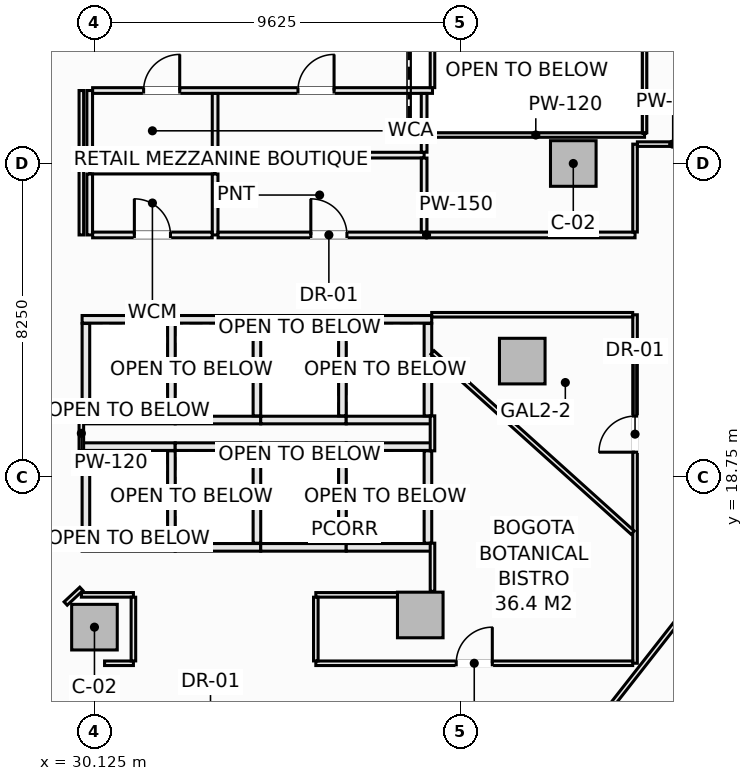
"""IFC4 building model, lengths in metres.
Left out: names, types, materials, properties, quantities, classifications, styles, units other than length and angle.
Written with IfcOpenShell. Run it as: python <this file> out.ifc"""

import sys

from ifc_helpers import new_model, si_unit, direction, frame, frame_2d, origin, origin_2d, place, context, subcontext, project, spatial, rectangle, extrude, element, fill, save


model = new_model("IFC4")
c1 = context("Model", 3, precision=1e-05, world=origin(), true_north=direction((0.0, 1.0)))
c2 = subcontext(c1, "Body", "Model", "MODEL_VIEW")
j1 = project(units=[si_unit("LENGTHUNIT", "METRE"), si_unit("PLANEANGLEUNIT", "RADIAN")], contexts=[c1])
p1 = place(None, origin())
s1 = spatial("IfcSite", under=j1, at=p1, CompositionType="ELEMENT")
p2 = place(p1, origin())
s2 = spatial("IfcBuilding", under=s1, at=p2, CompositionType="ELEMENT")
p3 = place(p2, frame((0.0, 0.0, 5.0)))
s3 = spatial("IfcBuildingStorey", under=s2, at=p3, CompositionType="ELEMENT", Elevation=5.0)
for number, where, z_axis, x_axis in (
    (1, (42.725, 27.0, -0.26), (0.0, 0.0, 1.0), (1.0, 0.0, 0.0)),
    (2, (30.125, 14.8, -0.26), (0.0, 0.0, 1.0), (1.0, 0.0, 0.0)),
    (3, (38.698, 15.121, -0.26), (0.0, 0.0, 1.0), (1.0, 0.0, 0.0)),
    (4, (41.382, 21.801, -0.26), (0.0, 0.0, 1.0), (1.0, 0.0, 0.0)),
):
    element("IfcColumn", number, at=place(p3, frame(where, z_axis=z_axis, x_axis=x_axis)), inside=s3, PredefinedType="COLUMN", context=c2, shape_type="SweptSolid", body=[
        extrude(rectangle(XDim=1.2, YDim=1.2, at=origin_2d()), origin(), (0.0, 0.0, 1.0), 5.0),
    ])
for number, where, z_axis, x_axis in (
    (5, (29.8, 19.55, 0.0), (0.0, 0.0, 1.0), (1.0, 0.0, 0.0)),
    (6, (29.8, 16.9, 0.0), (0.0, 0.0, 1.0), (1.0, 0.0, 0.0)),
):
    element("IfcWall", number, at=place(p3, frame(where, z_axis=z_axis, x_axis=x_axis)), inside=s3, PredefinedType="SOLIDWALL", context=c2, shape_type="SweptSolid", body=[
        extrude(rectangle(XDim=2.45, YDim=0.2, at=frame_2d((1.225, 0.0))), origin(), (0.0, 0.0, 1.0), 4.74),
    ])
for number, where, z_axis, x_axis in (
    (7, (29.9, 17.01, 0.0), (0.0, 0.0, 1.0), (0.0, 1.0, 0.0)),
    (8, (32.15, 17.01, 0.0), (0.0, 0.0, 1.0), (0.0, 1.0, 0.0)),
):
    element("IfcWall", number, at=place(p3, frame(where, z_axis=z_axis, x_axis=x_axis)), inside=s3, PredefinedType="SOLIDWALL", context=c2, shape_type="SweptSolid", body=[
        extrude(rectangle(XDim=2.43, YDim=0.2, at=frame_2d((1.215, 0.0))), origin(), (0.0, 0.0, 1.0), 4.74),
    ])
for number, where, z_axis, x_axis in (
    (9, (32.25, 19.55, 0.0), (0.0, 0.0, 1.0), (1.0, 0.0, 0.0)),
    (10, (32.25, 16.9, 0.0), (0.0, 0.0, 1.0), (1.0, 0.0, 0.0)),
):
    element("IfcWall", number, at=place(p3, frame(where, z_axis=z_axis, x_axis=x_axis)), inside=s3, PredefinedType="SOLIDWALL", context=c2, shape_type="SweptSolid", body=[
        extrude(rectangle(XDim=2.25, YDim=0.2, at=frame_2d((1.125, 0.0))), origin(), (0.0, 0.0, 1.0), 4.74),
    ])
p4 = place(p3, frame((34.4, 17.01, 0.0), z_axis=(0.0, 0.0, 1.0), x_axis=(0.0, 1.0, 0.0)))
e11 = element("IfcWall", 11, at=p4, inside=s3, PredefinedType="SOLIDWALL", context=c2, shape_type="SweptSolid", body=[
    extrude(rectangle(XDim=2.43, YDim=0.2, at=frame_2d((1.215, 0.0))), origin(), (0.0, 0.0, 1.0), 4.74),
])
for number, where, z_axis, x_axis in (
    (12, (34.5, 19.55, 0.0), (0.0, 0.0, 1.0), (1.0, 0.0, 0.0)),
    (13, (34.5, 16.9, 0.0), (0.0, 0.0, 1.0), (1.0, 0.0, 0.0)),
):
    element("IfcWall", number, at=place(p3, frame(where, z_axis=z_axis, x_axis=x_axis)), inside=s3, PredefinedType="SOLIDWALL", context=c2, shape_type="SweptSolid", body=[
        extrude(rectangle(XDim=2.25, YDim=0.2, at=frame_2d((1.125, 0.0))), origin(), (0.0, 0.0, 1.0), 4.74),
    ])
p5 = place(p3, frame((36.65, 17.01, 0.0), z_axis=(0.0, 0.0, 1.0), x_axis=(0.0, 1.0, 0.0)))
e14 = element("IfcWall", 14, at=p5, inside=s3, PredefinedType="SOLIDWALL", context=c2, shape_type="SweptSolid", body=[
    extrude(rectangle(XDim=2.43, YDim=0.2, at=frame_2d((1.215, 0.0))), origin(), (0.0, 0.0, 1.0), 4.74),
])
for number, where, z_axis, x_axis in (
    (15, (36.75, 19.55, 0.0), (0.0, 0.0, 1.0), (1.0, 0.0, 0.0)),
    (16, (36.75, 16.9, 0.0), (0.0, 0.0, 1.0), (1.0, 0.0, 0.0)),
):
    element("IfcWall", number, at=place(p3, frame(where, z_axis=z_axis, x_axis=x_axis)), inside=s3, PredefinedType="SOLIDWALL", context=c2, shape_type="SweptSolid", body=[
        extrude(rectangle(XDim=2.25, YDim=0.2, at=frame_2d((1.125, 0.0))), origin(), (0.0, 0.0, 1.0), 4.74),
    ])
p6 = place(p3, frame((38.9, 17.01, 0.0), z_axis=(0.0, 0.0, 1.0), x_axis=(0.0, 1.0, 0.0)))
e17 = element("IfcWall", 17, at=p6, inside=s3, PredefinedType="SOLIDWALL", context=c2, shape_type="SweptSolid", body=[
    extrude(rectangle(XDim=2.43, YDim=0.2, at=frame_2d((1.215, 0.0))), origin(), (0.0, 0.0, 1.0), 4.74),
])
for number, where, z_axis, x_axis in (
    (18, (29.8, 22.9, 0.0), (0.0, 0.0, 1.0), (1.0, 0.0, 0.0)),
    (19, (29.8, 20.25, 0.0), (0.0, 0.0, 1.0), (1.0, 0.0, 0.0)),
):
    element("IfcWall", number, at=place(p3, frame(where, z_axis=z_axis, x_axis=x_axis)), inside=s3, PredefinedType="SOLIDWALL", context=c2, shape_type="SweptSolid", body=[
        extrude(rectangle(XDim=2.45, YDim=0.2, at=frame_2d((1.225, 0.0))), origin(), (0.0, 0.0, 1.0), 4.74),
    ])
for number, where, z_axis, x_axis in (
    (20, (29.9, 20.36, 0.0), (0.0, 0.0, 1.0), (0.0, 1.0, 0.0)),
    (21, (32.15, 20.36, 0.0), (0.0, 0.0, 1.0), (0.0, 1.0, 0.0)),
):
    element("IfcWall", number, at=place(p3, frame(where, z_axis=z_axis, x_axis=x_axis)), inside=s3, PredefinedType="SOLIDWALL", context=c2, shape_type="SweptSolid", body=[
        extrude(rectangle(XDim=2.43, YDim=0.2, at=frame_2d((1.215, 0.0))), origin(), (0.0, 0.0, 1.0), 4.74),
    ])
for number, where, z_axis, x_axis in (
    (22, (32.25, 22.9, 0.0), (0.0, 0.0, 1.0), (1.0, 0.0, 0.0)),
    (23, (32.25, 20.25, 0.0), (0.0, 0.0, 1.0), (1.0, 0.0, 0.0)),
):
    element("IfcWall", number, at=place(p3, frame(where, z_axis=z_axis, x_axis=x_axis)), inside=s3, PredefinedType="SOLIDWALL", context=c2, shape_type="SweptSolid", body=[
        extrude(rectangle(XDim=2.25, YDim=0.2, at=frame_2d((1.125, 0.0))), origin(), (0.0, 0.0, 1.0), 4.74),
    ])
p7 = place(p3, frame((34.4, 20.36, 0.0), z_axis=(0.0, 0.0, 1.0), x_axis=(0.0, 1.0, 0.0)))
e24 = element("IfcWall", 24, at=p7, inside=s3, PredefinedType="SOLIDWALL", context=c2, shape_type="SweptSolid", body=[
    extrude(rectangle(XDim=2.43, YDim=0.2, at=frame_2d((1.215, 0.0))), origin(), (0.0, 0.0, 1.0), 4.74),
])
for number, where, z_axis, x_axis in (
    (25, (34.5, 22.9, 0.0), (0.0, 0.0, 1.0), (1.0, 0.0, 0.0)),
    (26, (34.5, 20.25, 0.0), (0.0, 0.0, 1.0), (1.0, 0.0, 0.0)),
):
    element("IfcWall", number, at=place(p3, frame(where, z_axis=z_axis, x_axis=x_axis)), inside=s3, PredefinedType="SOLIDWALL", context=c2, shape_type="SweptSolid", body=[
        extrude(rectangle(XDim=2.25, YDim=0.2, at=frame_2d((1.125, 0.0))), origin(), (0.0, 0.0, 1.0), 4.74),
    ])
p8 = place(p3, frame((36.65, 20.36, 0.0), z_axis=(0.0, 0.0, 1.0), x_axis=(0.0, 1.0, 0.0)))
e27 = element("IfcWall", 27, at=p8, inside=s3, PredefinedType="SOLIDWALL", context=c2, shape_type="SweptSolid", body=[
    extrude(rectangle(XDim=2.43, YDim=0.2, at=frame_2d((1.215, 0.0))), origin(), (0.0, 0.0, 1.0), 4.74),
])
for number, where, z_axis, x_axis in (
    (28, (36.75, 22.9, 0.0), (0.0, 0.0, 1.0), (1.0, 0.0, 0.0)),
    (29, (36.75, 20.25, 0.0), (0.0, 0.0, 1.0), (1.0, 0.0, 0.0)),
):
    element("IfcWall", number, at=place(p3, frame(where, z_axis=z_axis, x_axis=x_axis)), inside=s3, PredefinedType="SOLIDWALL", context=c2, shape_type="SweptSolid", body=[
        extrude(rectangle(XDim=2.25, YDim=0.2, at=frame_2d((1.125, 0.0))), origin(), (0.0, 0.0, 1.0), 4.74),
    ])
p9 = place(p3, frame((38.9, 20.36, 0.0), z_axis=(0.0, 0.0, 1.0), x_axis=(0.0, 1.0, 0.0)))
e30 = element("IfcWall", 30, at=p9, inside=s3, PredefinedType="SOLIDWALL", context=c2, shape_type="SweptSolid", body=[
    extrude(rectangle(XDim=2.43, YDim=0.2, at=frame_2d((1.215, 0.0))), origin(), (0.0, 0.0, 1.0), 4.74),
])
p10 = place(p3, frame((30.0, 26.8, 0.0), z_axis=(0.0, 0.0, 1.0), x_axis=(1.0, 0.0, 0.0)))
e31 = element("IfcWall", 31, at=p10, inside=s3, PredefinedType="PARTITIONING", context=c2, shape_type="SweptSolid", body=[
    extrude(rectangle(XDim=3.3, YDim=0.15, at=frame_2d((1.65, 0.0))), origin(), (0.0, 0.0, 1.0), 4.74),
])
p11 = place(p3, frame((30.0, 25.12, 0.0), z_axis=(0.0, 0.0, 1.0), x_axis=(0.0, 1.0, 0.0)))
e32 = element("IfcWall", 32, at=p11, inside=s3, PredefinedType="PARTITIONING", context=c2, shape_type="SweptSolid", body=[
    extrude(rectangle(XDim=1.603, YDim=0.15, at=frame_2d((0.801, 0.0))), origin(), (0.0, 0.0, 1.0), 4.74),
])
p12 = place(p3, frame((30.0, 26.877, 0.0), z_axis=(0.0, 0.0, 1.0), x_axis=(0.0, 1.0, 0.0)))
e33 = element("IfcWall", 33, at=p12, inside=s3, PredefinedType="PARTITIONING", context=c2, shape_type="SweptSolid", body=[
    extrude(rectangle(XDim=2.043, YDim=0.15, at=frame_2d((1.021, 0.0))), origin(), (0.0, 0.0, 1.0), 4.74),
])
p13 = place(p3, frame((30.077, 28.92, 0.0), z_axis=(0.0, 0.0, 1.0), x_axis=(1.0, 0.0, 0.0)))
e34 = element("IfcWall", 34, at=p13, inside=s3, PredefinedType="PARTITIONING", context=c2, shape_type="SweptSolid", body=[
    extrude(rectangle(XDim=8.943, YDim=0.15, at=frame_2d((4.472, 0.0))), origin(), (0.0, 0.0, 1.0), 4.74),
])
p14 = place(p13, frame((1.342, 0.0, 0.0)))
e35 = element("IfcOpeningElement", 35, at=p14, cuts=e34, PredefinedType="OPENING", context=c2, shape_type="SweptSolid", body=[
    extrude(rectangle(XDim=0.95, YDim=2.1, at=frame_2d((0.475, 1.05))), frame((0.0, 0.085, 0.0), z_axis=(0.0, -1.0, 0.0), x_axis=(1.0, 0.0, 0.0)), (0.0, 0.0, 1.0), 0.17),
])
p15 = place(p13, frame((5.403, 0.0, 0.0)))
e36 = element("IfcOpeningElement", 36, at=p15, cuts=e34, PredefinedType="OPENING", context=c2, shape_type="SweptSolid", body=[
    extrude(rectangle(XDim=0.95, YDim=2.1, at=frame_2d((0.475, 1.05))), frame((0.0, 0.085, 0.0), z_axis=(0.0, -1.0, 0.0), x_axis=(1.0, 0.0, 0.0)), (0.0, 0.0, 1.0), 0.17),
])
p16 = place(p3, frame((33.3, 25.12, 0.0), z_axis=(0.0, 0.0, 1.0), x_axis=(0.0, 1.0, 0.0)))
e37 = element("IfcWall", 37, at=p16, inside=s3, PredefinedType="PARTITIONING", context=c2, shape_type="SweptSolid", body=[
    extrude(rectangle(XDim=1.603, YDim=0.15, at=frame_2d((0.801, 0.0))), origin(), (0.0, 0.0, 1.0), 4.74),
])
p17 = place(p3, frame((33.3, 26.877, 0.0), z_axis=(0.0, 0.0, 1.0), x_axis=(0.0, 1.0, 0.0)))
e38 = element("IfcWall", 38, at=p17, inside=s3, PredefinedType="PARTITIONING", context=c2, shape_type="SweptSolid", body=[
    extrude(rectangle(XDim=1.966, YDim=0.15, at=frame_2d((0.983, 0.0))), origin(), (0.0, 0.0, 1.0), 4.74),
])
p18 = place(p3, frame((30.077, 25.12, 0.0), z_axis=(0.0, 0.0, 1.0), x_axis=(1.0, 0.0, 0.0)))
e39 = element("IfcWall", 39, at=p18, inside=s3, PredefinedType="PARTITIONING", context=c2, shape_type="SweptSolid", body=[
    extrude(rectangle(XDim=3.146, YDim=0.15, at=frame_2d((1.573, 0.0))), origin(), (0.0, 0.0, 1.0), 4.74),
])
p19 = place(p18, frame((1.098, 0.0, 0.0)))
e40 = element("IfcOpeningElement", 40, at=p19, cuts=e39, PredefinedType="OPENING", context=c2, shape_type="SweptSolid", body=[
    extrude(rectangle(XDim=0.95, YDim=2.1, at=frame_2d((0.475, 1.05))), frame((0.0, 0.085, 0.0), z_axis=(0.0, -1.0, 0.0), x_axis=(1.0, 0.0, 0.0)), (0.0, 0.0, 1.0), 0.17),
])
p20 = place(p3, frame((33.377, 25.12, 0.0), z_axis=(0.0, 0.0, 1.0), x_axis=(1.0, 0.0, 0.0)))
e41 = element("IfcWall", 41, at=p20, inside=s3, PredefinedType="PARTITIONING", context=c2, shape_type="SweptSolid", body=[
    extrude(rectangle(XDim=10.973, YDim=0.15, at=frame_2d((5.487, 0.0))), origin(), (0.0, 0.0, 1.0), 4.74),
])
p21 = place(p20, frame((2.441, 0.0, 0.0)))
e42 = element("IfcOpeningElement", 42, at=p21, cuts=e41, PredefinedType="OPENING", context=c2, shape_type="SweptSolid", body=[
    extrude(rectangle(XDim=0.95, YDim=2.1, at=frame_2d((0.475, 1.05))), frame((0.0, 0.085, 0.0), z_axis=(0.0, -1.0, 0.0), x_axis=(1.0, 0.0, 0.0)), (0.0, 0.0, 1.0), 0.17),
])
p22 = place(p3, frame((33.377, 27.22, 0.0), z_axis=(0.0, 0.0, 1.0), x_axis=(1.0, 0.0, 0.0)))
e43 = element("IfcWall", 43, at=p22, inside=s3, PredefinedType="PARTITIONING", context=c2, shape_type="SweptSolid", body=[
    extrude(rectangle(XDim=5.423, YDim=0.15, at=frame_2d((2.711, 0.0))), origin(), (0.0, 0.0, 1.0), 4.74),
])
p23 = place(p3, frame((38.8, 25.197, 0.0), z_axis=(0.0, 0.0, 1.0), x_axis=(0.0, 1.0, 0.0)))
e44 = element("IfcWall", 44, at=p23, inside=s3, PredefinedType="PARTITIONING", context=c2, shape_type="SweptSolid", body=[
    extrude(rectangle(XDim=1.946, YDim=0.15, at=frame_2d((0.973, 0.0))), origin(), (0.0, 0.0, 1.0), 4.74),
])
p24 = place(p3, frame((38.8, 27.297, 0.0), z_axis=(0.0, 0.0, 1.0), x_axis=(0.0, 1.0, 0.0)))
e45 = element("IfcWall", 45, at=p24, inside=s3, PredefinedType="PARTITIONING", context=c2, shape_type="SweptSolid", body=[
    extrude(rectangle(XDim=1.546, YDim=0.15, at=frame_2d((0.773, 0.0))), origin(), (0.0, 0.0, 1.0), 4.74),
])
p25 = place(p3, frame((29.78, 19.44, 0.0), z_axis=(0.0, 0.0, 1.0), x_axis=(0.0, 1.0, 0.0)))
e46 = element("IfcWall", 46, at=p25, inside=s3, PredefinedType="PARTITIONING", context=c2, shape_type="SweptSolid", body=[
    extrude(rectangle(XDim=0.92, YDim=0.12, at=frame_2d((0.46, 0.0))), origin(), (0.0, 0.0, 1.0), 4.74),
])
p26 = place(p3, frame((29.78, 25.12, 0.0), z_axis=(0.0, 0.0, 1.0), x_axis=(0.0, 1.0, 0.0)))
e47 = element("IfcWall", 47, at=p26, inside=s3, PredefinedType="PARTITIONING", context=c2, shape_type="SweptSolid", body=[
    extrude(rectangle(XDim=3.8, YDim=0.12, at=frame_2d((1.9, 0.0))), origin(), (0.0, 0.0, 1.0), 4.74),
])
p27 = place(p3, frame((39.02, 15.742, 0.0), z_axis=(0.0, 0.0, 1.0), x_axis=(0.0, 1.0, 0.0)))
e48 = element("IfcWall", 48, at=p27, inside=s3, PredefinedType="PARTITIONING", context=c2, shape_type="SweptSolid", body=[
    extrude(rectangle(XDim=1.268, YDim=0.12, at=frame_2d((0.634, 0.0))), origin(), (0.0, 0.0, 1.0), 3.974),
])
p28 = place(p3, frame((39.02, 19.44, 0.0), z_axis=(0.0, 0.0, 1.0), x_axis=(0.0, 1.0, 0.0)))
e49 = element("IfcWall", 49, at=p28, inside=s3, PredefinedType="PARTITIONING", context=c2, shape_type="SweptSolid", body=[
    extrude(rectangle(XDim=0.92, YDim=0.12, at=frame_2d((0.46, 0.0))), origin(), (0.0, 0.0, 1.0), 4.74),
])
p29 = place(p3, frame((39.02, 28.997, 0.0), z_axis=(0.0, 0.0, 1.0), x_axis=(0.0, 1.0, 0.0)))
e50 = element("IfcWall", 50, at=p29, inside=s3, PredefinedType="PARTITIONING", context=c2, shape_type="SweptSolid", body=[
    extrude(rectangle(XDim=1.983, YDim=0.12, at=frame_2d((0.991, 0.0))), origin(), (0.0, 0.0, 1.0), 4.74),
])
p30 = place(p3, frame((44.35, 13.85, 0.0), z_axis=(0.0, 0.0, 1.0), x_axis=(0.0, 1.0, 0.0)))
e51 = element("IfcWall", 51, at=p30, inside=s3, PredefinedType="PARTITIONING", context=c2, shape_type="SweptSolid", body=[
    extrude(rectangle(XDim=9.17, YDim=0.12, at=frame_2d((4.585, 0.0))), origin(), (0.0, 0.0, 1.0), 4.74),
])
p31 = place(p30, frame((5.554, 0.0, 0.0)))
e52 = element("IfcOpeningElement", 52, at=p31, cuts=e51, PredefinedType="OPENING", context=c2, shape_type="SweptSolid", body=[
    extrude(rectangle(XDim=0.95, YDim=2.1, at=frame_2d((0.475, 1.05))), frame((0.0, 0.07, 0.0), z_axis=(0.0, -1.0, 0.0), x_axis=(1.0, 0.0, 0.0)), (0.0, 0.0, 1.0), 0.14),
])
p32 = place(p3, frame((44.35, 25.197, 0.0), z_axis=(0.0, 0.0, 1.0), x_axis=(0.0, 1.0, 0.0)))
e53 = element("IfcWall", 53, at=p32, inside=s3, PredefinedType="PARTITIONING", context=c2, shape_type="SweptSolid", body=[
    extrude(rectangle(XDim=2.313, YDim=0.12, at=frame_2d((1.156, 0.0))), origin(), (0.0, 0.0, 1.0), 4.74),
])
p33 = place(p3, frame((44.412, 27.51, 0.0), z_axis=(0.0, 0.0, 1.0), x_axis=(1.0, 0.0, 0.0)))
e54 = element("IfcWall", 54, at=p33, inside=s3, PredefinedType="PARTITIONING", context=c2, shape_type="SweptSolid", body=[
    extrude(rectangle(XDim=1.858, YDim=0.12, at=frame_2d((0.929, 0.0))), origin(), (0.0, 0.0, 1.0), 4.74),
])
p34 = place(p3, frame((42.957, 11.75, 0.0), z_axis=(0.0, 0.0, 1.0), x_axis=(0.616428289415, 0.78741105149, 0.0)))
e55 = element("IfcWall", 55, at=p34, inside=s3, PredefinedType="PARTITIONING", context=c2, shape_type="SweptSolid", body=[
    extrude(rectangle(XDim=5.375, YDim=0.12, at=frame_2d((2.687, 0.0))), origin(), (0.0, 0.0, 1.0), 4.74),
])
p35 = place(p3, frame((30.391, 13.85, 0.0), z_axis=(0.0, 0.0, 1.0), x_axis=(1.0, 0.0, 0.0)))
e56 = element("IfcWall", 56, at=p35, inside=s3, PredefinedType="PARTITIONING", context=c2, shape_type="SweptSolid", body=[
    extrude(rectangle(XDim=0.759, YDim=0.12, at=frame_2d((0.379, 0.0))), origin(), (0.0, 0.0, 1.0), 4.74),
])
p36 = place(p3, frame((35.95, 13.85, 0.0), z_axis=(0.0, 0.0, 1.0), x_axis=(1.0, 0.0, 0.0)))
e57 = element("IfcWall", 57, at=p36, inside=s3, PredefinedType="PARTITIONING", context=c2, shape_type="SweptSolid", body=[
    extrude(rectangle(XDim=8.338, YDim=0.12, at=frame_2d((4.169, 0.0))), origin(), (0.0, 0.0, 1.0), 4.74),
])
p37 = place(p36, frame((3.694, 0.0, 0.0)))
e58 = element("IfcOpeningElement", 58, at=p37, cuts=e57, PredefinedType="OPENING", context=c2, shape_type="SweptSolid", body=[
    extrude(rectangle(XDim=0.95, YDim=2.1, at=frame_2d((0.475, 1.05))), frame((0.0, 0.07, 0.0), z_axis=(0.0, -1.0, 0.0), x_axis=(1.0, 0.0, 0.0)), (0.0, 0.0, 1.0), 0.14),
])
p38 = place(p3, frame((29.78, 15.65, 0.0), z_axis=(0.0, 0.0, 1.0), x_axis=(1.0, 0.0, 0.0)))
e59 = element("IfcWall", 59, at=p38, inside=s3, PredefinedType="PARTITIONING", context=c2, shape_type="SweptSolid", body=[
    extrude(rectangle(XDim=1.37, YDim=0.12, at=frame_2d((0.685, 0.0))), origin(), (0.0, 0.0, 1.0), 4.74),
])
p39 = place(p3, frame((35.95, 15.65, 0.0), z_axis=(0.0, 0.0, 1.0), x_axis=(1.0, 0.0, 0.0)))
e60 = element("IfcWall", 60, at=p39, inside=s3, PredefinedType="PARTITIONING", context=c2, shape_type="SweptSolid", body=[
    extrude(rectangle(XDim=2.291, YDim=0.12, at=frame_2d((1.146, 0.0))), origin(), (0.0, 0.0, 1.0), 4.74),
])
p40 = place(p3, frame((35.95, 13.912, 0.0), z_axis=(0.0, 0.0, 1.0), x_axis=(0.0, 1.0, 0.0)))
e61 = element("IfcWall", 61, at=p40, inside=s3, PredefinedType="PARTITIONING", context=c2, shape_type="SweptSolid", body=[
    extrude(rectangle(XDim=1.676, YDim=0.12, at=frame_2d((0.838, 0.0))), origin(), (0.0, 0.0, 1.0), 4.74),
])
p41 = place(p3, frame((39.0, 23.02, 0.0), z_axis=(0.0, 0.0, 1.0), x_axis=(1.0, 0.0, 0.0)))
e62 = element("IfcWall", 62, at=p41, inside=s3, PredefinedType="PARTITIONING", context=c2, shape_type="SweptSolid", body=[
    extrude(rectangle(XDim=5.288, YDim=0.12, at=frame_2d((2.644, 0.0))), origin(), (0.0, 0.0, 1.0), 4.74),
])
p42 = place(p3, frame((29.367, 15.422, 0.0), z_axis=(0.0, 0.0, 1.0), x_axis=(0.730667420492, 0.682733564893, 0.0)))
e63 = element("IfcWall", 63, at=p42, inside=s3, PredefinedType="PARTITIONING", context=c2, shape_type="SweptSolid", body=[
    extrude(rectangle(XDim=0.565, YDim=0.12, at=frame_2d((0.283, 0.0))), origin(), (0.0, 0.0, 1.0), 4.74),
])
p43 = place(p3, frame((31.15, 13.912, 0.0), z_axis=(0.0, 0.0, 1.0), x_axis=(0.0, 1.0, 0.0)))
e64 = element("IfcWall", 64, at=p43, inside=s3, PredefinedType="PARTITIONING", context=c2, shape_type="SweptSolid", body=[
    extrude(rectangle(XDim=1.676, YDim=0.12, at=frame_2d((0.838, 0.0))), origin(), (0.0, 0.0, 1.0), 4.74),
])
p44 = place(p3, frame((38.877, 27.75, 0.0), z_axis=(0.0, 0.0, 1.0), x_axis=(1.0, 0.0, 0.0)))
e65 = element("IfcWall", 65, at=p44, inside=s3, PredefinedType="PARTITIONING", context=c2, shape_type="SweptSolid", body=[
    extrude(rectangle(XDim=5.723, YDim=0.12, at=frame_2d((2.862, 0.0))), origin(), (0.0, 0.0, 1.0), 4.74),
])
p45 = place(p3, frame((44.6, 27.812, 0.0), z_axis=(0.0, 0.0, 1.0), x_axis=(0.0, 1.0, 0.0)))
e66 = element("IfcWall", 66, at=p45, inside=s3, PredefinedType="PARTITIONING", context=c2, shape_type="SweptSolid", body=[
    extrude(rectangle(XDim=3.288, YDim=0.12, at=frame_2d((1.644, 0.0))), origin(), (0.0, 0.0, 1.0), 4.74),
])
p46 = place(p3, frame((39.02, 22.03, 0.0), z_axis=(0.0, 0.0, 1.0), x_axis=(0.743160554948, -0.669113136599, 0.0)))
e67 = element("IfcWall", 67, at=p46, inside=s3, PredefinedType="PARTITIONING", context=c2, shape_type="SweptSolid", body=[
    extrude(rectangle(XDim=7.089, YDim=0.12, at=frame_2d((3.544, 0.0))), origin(), (0.0, 0.0, 1.0), 4.74),
])
p47 = place(p14, origin())
e68 = element("IfcDoor", 68, at=p47, inside=s3, OperationType="SINGLE_SWING_RIGHT", PredefinedType="DOOR", context=c2, shape_type="SweptSolid", body=[
    extrude(rectangle(XDim=0.95, YDim=2.1, at=frame_2d((0.475, 1.05))), frame((0.0, 0.025, 0.0), z_axis=(0.0, -1.0, 0.0), x_axis=(1.0, 0.0, 0.0)), (0.0, 0.0, 1.0), 0.05),
])
fill(e35, e68)
p48 = place(p19, origin())
e69 = element("IfcDoor", 69, at=p48, inside=s3, OperationType="SINGLE_SWING_LEFT", PredefinedType="DOOR", context=c2, shape_type="SweptSolid", body=[
    extrude(rectangle(XDim=0.95, YDim=2.1, at=frame_2d((0.475, 1.05))), frame((0.0, 0.025, 0.0), z_axis=(0.0, -1.0, 0.0), x_axis=(1.0, 0.0, 0.0)), (0.0, 0.0, 1.0), 0.05),
])
fill(e40, e69)
p49 = place(p15, origin())
e70 = element("IfcDoor", 70, at=p49, inside=s3, OperationType="SINGLE_SWING_RIGHT", PredefinedType="DOOR", context=c2, shape_type="SweptSolid", body=[
    extrude(rectangle(XDim=0.95, YDim=2.1, at=frame_2d((0.475, 1.05))), frame((0.0, 0.025, 0.0), z_axis=(0.0, -1.0, 0.0), x_axis=(1.0, 0.0, 0.0)), (0.0, 0.0, 1.0), 0.05),
])
fill(e36, e70)
p50 = place(p21, origin())
e71 = element("IfcDoor", 71, at=p50, inside=s3, OperationType="SINGLE_SWING_LEFT", PredefinedType="DOOR", context=c2, shape_type="SweptSolid", body=[
    extrude(rectangle(XDim=0.95, YDim=2.1, at=frame_2d((0.475, 1.05))), frame((0.0, 0.025, 0.0), z_axis=(0.0, -1.0, 0.0), x_axis=(1.0, 0.0, 0.0)), (0.0, 0.0, 1.0), 0.05),
])
fill(e42, e71)
p51 = place(p31, origin())
e72 = element("IfcDoor", 72, at=p51, inside=s3, OperationType="SINGLE_SWING_LEFT", PredefinedType="DOOR", context=c2, shape_type="SweptSolid", body=[
    extrude(rectangle(XDim=0.95, YDim=2.1, at=frame_2d((0.475, 1.05))), frame((0.0, 0.025, 0.0), z_axis=(0.0, -1.0, 0.0), x_axis=(1.0, 0.0, 0.0)), (0.0, 0.0, 1.0), 0.05),
])
fill(e52, e72)
p52 = place(p37, origin())
e73 = element("IfcDoor", 73, at=p52, inside=s3, OperationType="SINGLE_SWING_RIGHT", PredefinedType="DOOR", context=c2, shape_type="SweptSolid", body=[
    extrude(rectangle(XDim=0.95, YDim=2.1, at=frame_2d((0.475, 1.05))), frame((0.0, 0.025, 0.0), z_axis=(0.0, -1.0, 0.0), x_axis=(1.0, 0.0, 0.0)), (0.0, 0.0, 1.0), 0.05),
])
fill(e58, e73)
save(model, sys.argv[1])
